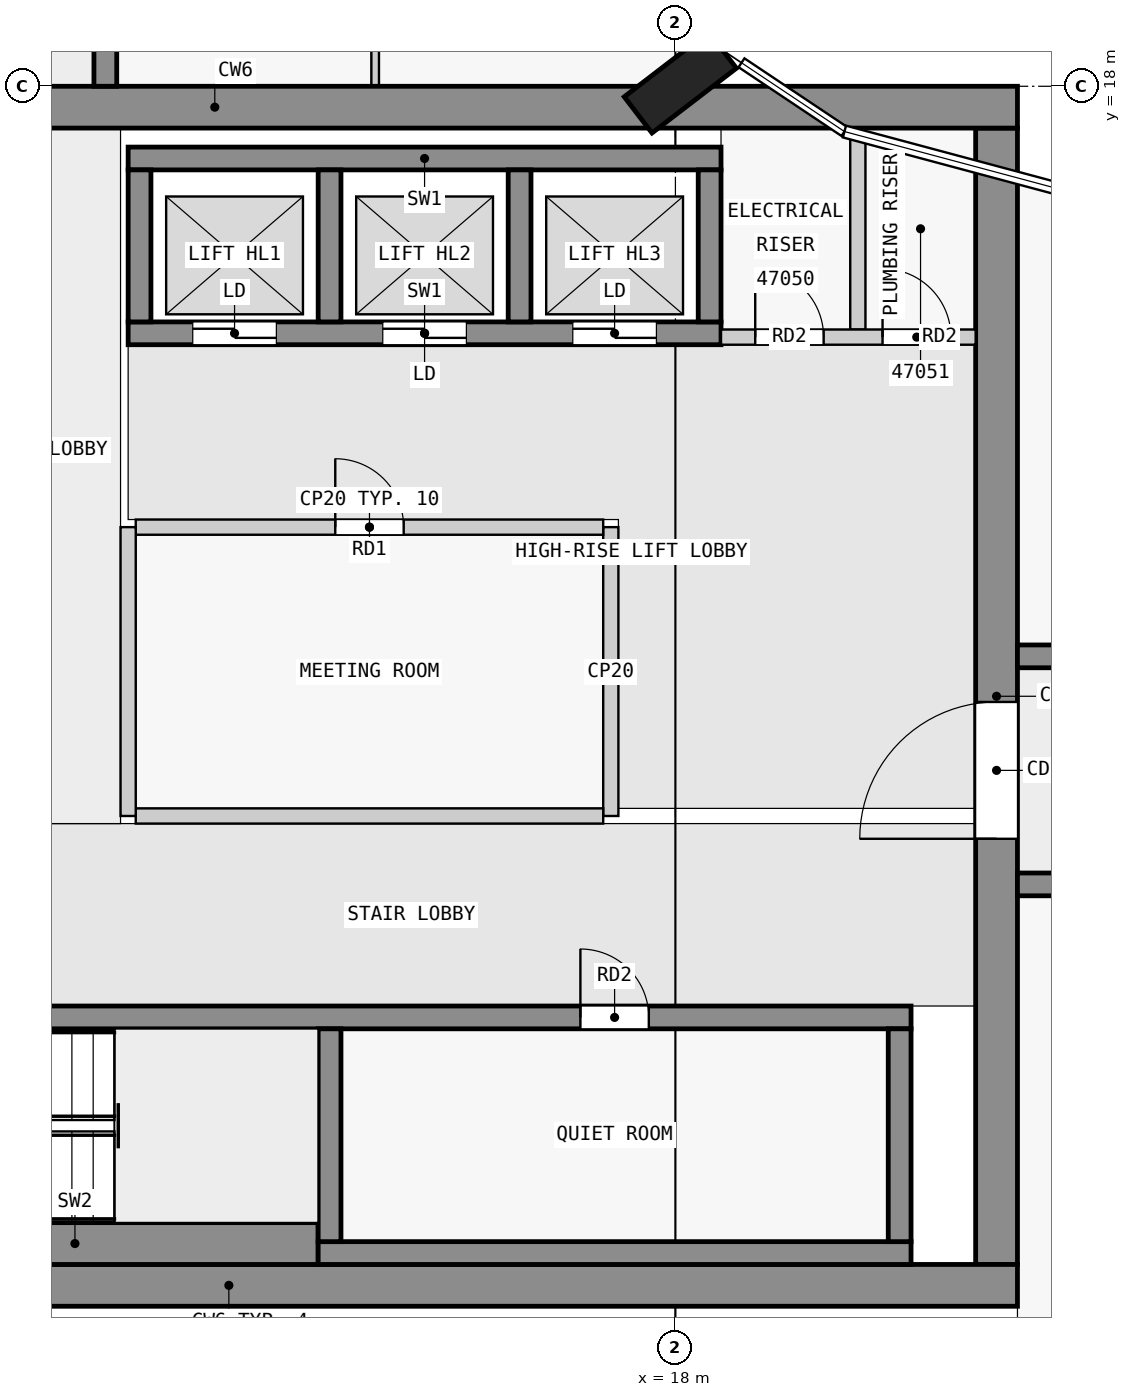
"""IFC4 building model, lengths in metres.
Left out: names, types, materials, properties, quantities, classifications, styles, units other than length and angle.
Written with IfcOpenShell. Run it as: python <this file> out.ifc"""

import sys

from ifc_helpers import new_model, si_unit, direction, frame, frame_2d, origin, origin_2d, place, context, subcontext, project, spatial, rectangle, extrude, element, fill, save


model = new_model("IFC4")
c1 = context("Model", 3, precision=1e-05, world=origin(), true_north=direction((0.0, 1.0)))
c2 = subcontext(c1, "Body", "Model", "MODEL_VIEW")
j1 = project(units=[si_unit("LENGTHUNIT", "METRE"), si_unit("PLANEANGLEUNIT", "RADIAN")], contexts=[c1])
p1 = place(None, origin())
s1 = spatial("IfcSite", under=j1, at=p1, CompositionType="ELEMENT")
p2 = place(p1, origin())
s2 = spatial("IfcBuilding", under=s1, at=p2, CompositionType="ELEMENT")
p3 = place(p2, frame((0.0, 0.0, 181.4)))
s3 = spatial("IfcBuildingStorey", under=s2, at=p3, CompositionType="ELEMENT", Elevation=181.4)
p4 = place(p3, frame((18.065, 18.05, 0.0), z_axis=(0.0, 0.0, 1.0), x_axis=(-0.608810846443, 0.793315418515, 0.0)))
e1 = element("IfcColumn", 1, at=p4, inside=s3, PredefinedType="COLUMN", context=c2, shape_type="SweptSolid", body=[
    extrude(rectangle(XDim=0.6, YDim=1.4, at=origin_2d()), origin(), (0.0, 0.0, 1.0), 3.5),
])
p5 = place(p3, frame((1.75, 2.225, 0.0), z_axis=(0.0, 0.0, 1.0), x_axis=(1.0, 0.0, 0.0)))
e2 = element("IfcWall", 2, at=p5, inside=s3, PredefinedType="SHEAR", context=c2, shape_type="SweptSolid", body=[
    extrude(rectangle(XDim=20.75, YDim=0.55, at=frame_2d((10.375, 0.0))), origin(), (0.0, 0.0, 1.0), 3.2),
])
p6 = place(p3, frame((1.38, 17.725, 0.0), z_axis=(0.0, 0.0, 1.0), x_axis=(1.0, 0.0, 0.0)))
e3 = element("IfcWall", 3, at=p6, inside=s3, PredefinedType="SHEAR", context=c2, shape_type="SweptSolid", body=[
    extrude(rectangle(XDim=21.12, YDim=0.55, at=frame_2d((10.56, 0.0))), origin(), (0.0, 0.0, 1.0), 3.2),
])
p7 = place(p6, frame((6.35, 0.0, 0.0)))
e4 = element("IfcOpeningElement", 4, at=p7, cuts=e3, PredefinedType="OPENING", context=c2, shape_type="SweptSolid", body=[
    extrude(rectangle(XDim=1.8, YDim=2.1, at=frame_2d((0.9, 1.05))), frame((0.0, 0.285, 0.0), z_axis=(0.0, -1.0, 0.0), x_axis=(1.0, 0.0, 0.0)), (0.0, 0.0, 1.0), 0.57),
])
p8 = place(p3, frame((22.225, 2.5, 0.0), z_axis=(0.0, 0.0, 1.0), x_axis=(0.0, 1.0, 0.0)))
e5 = element("IfcWall", 5, at=p8, inside=s3, PredefinedType="SHEAR", context=c2, shape_type="SweptSolid", body=[
    extrude(rectangle(XDim=14.95, YDim=0.55, at=frame_2d((7.475, 0.0))), origin(), (0.0, 0.0, 1.0), 3.2),
])
p9 = place(p8, frame((5.6, 0.0, 0.0)))
e6 = element("IfcOpeningElement", 6, at=p9, cuts=e5, PredefinedType="OPENING", context=c2, shape_type="SweptSolid", body=[
    extrude(rectangle(XDim=1.8, YDim=2.1, at=frame_2d((0.9, 1.05))), frame((0.0, 0.285, 0.0), z_axis=(0.0, -1.0, 0.0), x_axis=(1.0, 0.0, 0.0)), (0.0, 0.0, 1.0), 0.57),
])
p10 = place(p3, frame((6.9, 2.775, 0.0), z_axis=(0.0, 0.0, 1.0), x_axis=(1.0, 0.0, 0.0)))
e7 = element("IfcWall", 7, at=p10, inside=s3, PredefinedType="SHEAR", context=c2, shape_type="SweptSolid", body=[
    extrude(rectangle(XDim=6.4, YDim=0.55, at=frame_2d((3.2, 0.0))), origin(), (0.0, 0.0, 1.0), 3.2),
])
p11 = place(p3, frame((13.3, 2.65, 0.0), z_axis=(0.0, 0.0, 1.0), x_axis=(1.0, 0.0, 0.0)))
e8 = element("IfcWall", 8, at=p11, inside=s3, PredefinedType="SHEAR", context=c2, shape_type="SweptSolid", body=[
    extrude(rectangle(XDim=7.8, YDim=0.3, at=frame_2d((3.9, 0.0))), origin(), (0.0, 0.0, 1.0), 3.2),
])
for number, where, z_axis, x_axis in (
    (9, (13.45, 2.8, 0.0), (0.0, 0.0, 1.0), (0.0, 1.0, 0.0)),
    (10, (20.95, 2.8, 0.0), (0.0, 0.0, 1.0), (0.0, 1.0, 0.0)),
):
    element("IfcWall", number, at=place(p3, frame(where, z_axis=z_axis, x_axis=x_axis)), inside=s3, PredefinedType="SHEAR", context=c2, shape_type="SweptSolid", body=[
        extrude(rectangle(XDim=2.8, YDim=0.3, at=frame_2d((1.4, 0.0))), origin(), (0.0, 0.0, 1.0), 3.2),
    ])
p12 = place(p3, frame((2.3, 5.75, 0.0), z_axis=(0.0, 0.0, 1.0), x_axis=(1.0, 0.0, 0.0)))
e11 = element("IfcWall", 11, at=p12, inside=s3, PredefinedType="SHEAR", context=c2, shape_type="SweptSolid", body=[
    extrude(rectangle(XDim=18.8, YDim=0.3, at=frame_2d((9.4, 0.0))), origin(), (0.0, 0.0, 1.0), 3.2),
])
p13 = place(p12, frame((4.65, 0.0, 0.0)))
e12 = element("IfcOpeningElement", 12, at=p13, cuts=e11, PredefinedType="OPENING", context=c2, shape_type="SweptSolid", body=[
    extrude(rectangle(XDim=1.1, YDim=2.1, at=frame_2d((0.55, 1.05))), frame((0.0, 0.16, 0.0), z_axis=(0.0, -1.0, 0.0), x_axis=(1.0, 0.0, 0.0)), (0.0, 0.0, 1.0), 0.32),
])
p14 = place(p12, frame((0.45, 0.0, 0.0)))
e13 = element("IfcOpeningElement", 13, at=p14, cuts=e11, PredefinedType="OPENING", context=c2, shape_type="SweptSolid", body=[
    extrude(rectangle(XDim=1.1, YDim=2.1, at=frame_2d((0.55, 1.05))), frame((0.0, 0.16, 0.0), z_axis=(0.0, -1.0, 0.0), x_axis=(1.0, 0.0, 0.0)), (0.0, 0.0, 1.0), 0.32),
])
p15 = place(p12, frame((2.75, 0.0, 0.0)))
e14 = element("IfcOpeningElement", 14, at=p15, cuts=e11, PredefinedType="OPENING", context=c2, shape_type="SweptSolid", body=[
    extrude(rectangle(XDim=1.1, YDim=2.1, at=frame_2d((0.55, 1.05))), frame((0.0, 0.16, 0.0), z_axis=(0.0, -1.0, 0.0), x_axis=(1.0, 0.0, 0.0)), (0.0, 0.0, 1.0), 0.32),
])
p16 = place(p12, frame((14.45, 0.0, 0.0)))
e15 = element("IfcOpeningElement", 15, at=p16, cuts=e11, PredefinedType="OPENING", context=c2, shape_type="SweptSolid", body=[
    extrude(rectangle(XDim=0.9, YDim=2.1, at=frame_2d((0.45, 1.05))), frame((0.0, 0.16, 0.0), z_axis=(0.0, -1.0, 0.0), x_axis=(1.0, 0.0, 0.0)), (0.0, 0.0, 1.0), 0.32),
])
p17 = place(p3, frame((10.8, 17.05, 0.0), z_axis=(0.0, 0.0, 1.0), x_axis=(1.0, 0.0, 0.0)))
e16 = element("IfcWall", 16, at=p17, inside=s3, PredefinedType="SHEAR", context=c2, shape_type="SweptSolid", body=[
    extrude(rectangle(XDim=7.8, YDim=0.3, at=frame_2d((3.9, 0.0))), origin(), (0.0, 0.0, 1.0), 3.2),
])
p18 = place(p3, frame((10.8, 14.75, 0.0), z_axis=(0.0, 0.0, 1.0), x_axis=(1.0, 0.0, 0.0)))
e17 = element("IfcWall", 17, at=p18, inside=s3, PredefinedType="SHEAR", context=c2, shape_type="SweptSolid", body=[
    extrude(rectangle(XDim=7.8, YDim=0.3, at=frame_2d((3.9, 0.0))), origin(), (0.0, 0.0, 1.0), 3.2),
])
p19 = place(p18, frame((0.85, 0.0, 0.0)))
e18 = element("IfcOpeningElement", 18, at=p19, cuts=e17, PredefinedType="OPENING", context=c2, shape_type="SweptSolid", body=[
    extrude(rectangle(XDim=1.1, YDim=2.1, at=frame_2d((0.55, 1.05))), frame((0.0, 0.16, 0.0), z_axis=(0.0, -1.0, 0.0), x_axis=(1.0, 0.0, 0.0)), (0.0, 0.0, 1.0), 0.32),
])
p20 = place(p18, frame((3.35, 0.0, 0.0)))
e19 = element("IfcOpeningElement", 19, at=p20, cuts=e17, PredefinedType="OPENING", context=c2, shape_type="SweptSolid", body=[
    extrude(rectangle(XDim=1.1, YDim=2.1, at=frame_2d((0.55, 1.05))), frame((0.0, 0.16, 0.0), z_axis=(0.0, -1.0, 0.0), x_axis=(1.0, 0.0, 0.0)), (0.0, 0.0, 1.0), 0.32),
])
p21 = place(p18, frame((5.85, 0.0, 0.0)))
e20 = element("IfcOpeningElement", 20, at=p21, cuts=e17, PredefinedType="OPENING", context=c2, shape_type="SweptSolid", body=[
    extrude(rectangle(XDim=1.1, YDim=2.1, at=frame_2d((0.55, 1.05))), frame((0.0, 0.16, 0.0), z_axis=(0.0, -1.0, 0.0), x_axis=(1.0, 0.0, 0.0)), (0.0, 0.0, 1.0), 0.32),
])
for number, where, z_axis, x_axis in (
    (21, (10.95, 14.9, 0.0), (0.0, 0.0, 1.0), (0.0, 1.0, 0.0)),
    (22, (13.45, 14.9, 0.0), (0.0, 0.0, 1.0), (0.0, 1.0, 0.0)),
    (23, (15.95, 14.9, 0.0), (0.0, 0.0, 1.0), (0.0, 1.0, 0.0)),
    (24, (18.45, 14.9, 0.0), (0.0, 0.0, 1.0), (0.0, 1.0, 0.0)),
):
    element("IfcWall", number, at=place(p3, frame(where, z_axis=z_axis, x_axis=x_axis)), inside=s3, PredefinedType="SHEAR", context=c2, shape_type="SweptSolid", body=[
        extrude(rectangle(XDim=2.0, YDim=0.3, at=frame_2d((1.0, 0.0))), origin(), (0.0, 0.0, 1.0), 3.2),
    ])
p22 = place(p3, frame((22.5, 7.5, 0.0), z_axis=(0.0, 0.0, 1.0), x_axis=(1.0, 0.0, 0.0)))
e25 = element("IfcWall", 25, at=p22, inside=s3, PredefinedType="SHEAR", context=c2, shape_type="SweptSolid", body=[
    extrude(rectangle(XDim=22.5, YDim=0.3, at=frame_2d((11.25, 0.0))), origin(), (0.0, 0.0, 1.0), 3.2),
])
p23 = place(p22, frame((3.65, 0.0, 0.0)))
e26 = element("IfcOpeningElement", 26, at=p23, cuts=e25, PredefinedType="OPENING", context=c2, shape_type="SweptSolid", body=[
    extrude(rectangle(XDim=1.8, YDim=2.1, at=frame_2d((0.9, 1.05))), frame((0.0, 0.16, 0.0), z_axis=(0.0, -1.0, 0.0), x_axis=(1.0, 0.0, 0.0)), (0.0, 0.0, 1.0), 0.32),
])
p24 = place(p22, frame((12.65, 0.0, 0.0)))
e27 = element("IfcOpeningElement", 27, at=p24, cuts=e25, PredefinedType="OPENING", context=c2, shape_type="SweptSolid", body=[
    extrude(rectangle(XDim=1.8, YDim=2.1, at=frame_2d((0.9, 1.05))), frame((0.0, 0.16, 0.0), z_axis=(0.0, -1.0, 0.0), x_axis=(1.0, 0.0, 0.0)), (0.0, 0.0, 1.0), 0.32),
])
p25 = place(p22, frame((18.75, 0.0, 0.0)))
e28 = element("IfcOpeningElement", 28, at=p25, cuts=e25, PredefinedType="OPENING", context=c2, shape_type="SweptSolid", body=[
    extrude(rectangle(XDim=0.9, YDim=2.1, at=frame_2d((0.45, 1.05))), frame((0.0, 0.16, 0.0), z_axis=(0.0, -1.0, 0.0), x_axis=(1.0, 0.0, 0.0)), (0.0, 0.0, 1.0), 0.32),
])
p26 = place(p22, frame((20.95, 0.0, 0.0)))
e29 = element("IfcOpeningElement", 29, at=p26, cuts=e25, PredefinedType="OPENING", context=c2, shape_type="SweptSolid", body=[
    extrude(rectangle(XDim=1.0, YDim=2.1, at=frame_2d((0.5, 1.05))), frame((0.0, 0.16, 0.0), z_axis=(0.0, -1.0, 0.0), x_axis=(1.0, 0.0, 0.0)), (0.0, 0.0, 1.0), 0.32),
])
p27 = place(p3, frame((22.5, 10.5, 0.0), z_axis=(0.0, 0.0, 1.0), x_axis=(1.0, 0.0, 0.0)))
e30 = element("IfcWall", 30, at=p27, inside=s3, PredefinedType="SHEAR", context=c2, shape_type="SweptSolid", body=[
    extrude(rectangle(XDim=22.5, YDim=0.3, at=frame_2d((11.25, 0.0))), origin(), (0.0, 0.0, 1.0), 3.2),
])
p28 = place(p27, frame((3.65, 0.0, 0.0)))
e31 = element("IfcOpeningElement", 31, at=p28, cuts=e30, PredefinedType="OPENING", context=c2, shape_type="SweptSolid", body=[
    extrude(rectangle(XDim=1.8, YDim=2.1, at=frame_2d((0.9, 1.05))), frame((0.0, 0.16, 0.0), z_axis=(0.0, -1.0, 0.0), x_axis=(1.0, 0.0, 0.0)), (0.0, 0.0, 1.0), 0.32),
])
p29 = place(p27, frame((10.35, 0.0, 0.0)))
e32 = element("IfcOpeningElement", 32, at=p29, cuts=e30, PredefinedType="OPENING", context=c2, shape_type="SweptSolid", body=[
    extrude(rectangle(XDim=1.8, YDim=2.1, at=frame_2d((0.9, 1.05))), frame((0.0, 0.16, 0.0), z_axis=(0.0, -1.0, 0.0), x_axis=(1.0, 0.0, 0.0)), (0.0, 0.0, 1.0), 0.32),
])
p30 = place(p27, frame((14.35, 0.0, 0.0)))
e33 = element("IfcOpeningElement", 33, at=p30, cuts=e30, PredefinedType="OPENING", context=c2, shape_type="SweptSolid", body=[
    extrude(rectangle(XDim=0.9, YDim=2.1, at=frame_2d((0.45, 1.05))), frame((0.0, 0.16, 0.0), z_axis=(0.0, -1.0, 0.0), x_axis=(1.0, 0.0, 0.0)), (0.0, 0.0, 1.0), 0.32),
])
p31 = place(p27, frame((16.65, 0.0, 0.0)))
e34 = element("IfcOpeningElement", 34, at=p31, cuts=e30, PredefinedType="OPENING", context=c2, shape_type="SweptSolid", body=[
    extrude(rectangle(XDim=0.9, YDim=2.1, at=frame_2d((0.45, 1.05))), frame((0.0, 0.16, 0.0), z_axis=(0.0, -1.0, 0.0), x_axis=(1.0, 0.0, 0.0)), (0.0, 0.0, 1.0), 0.32),
])
p32 = place(p27, frame((19.35, 0.0, 0.0)))
e35 = element("IfcOpeningElement", 35, at=p32, cuts=e30, PredefinedType="OPENING", context=c2, shape_type="SweptSolid", body=[
    extrude(rectangle(XDim=1.8, YDim=2.1, at=frame_2d((0.9, 1.05))), frame((0.0, 0.16, 0.0), z_axis=(0.0, -1.0, 0.0), x_axis=(1.0, 0.0, 0.0)), (0.0, 0.0, 1.0), 0.32),
])
p33 = place(p3, frame((10.5, 18.0, 0.0), z_axis=(0.0, 0.0, 1.0), x_axis=(0.0, 1.0, 0.0)))
e36 = element("IfcWall", 36, at=p33, inside=s3, PredefinedType="SHEAR", context=c2, shape_type="SweptSolid", body=[
    extrude(rectangle(XDim=27.0, YDim=0.3, at=frame_2d((13.5, 0.0))), origin(), (0.0, 0.0, 1.0), 3.2),
])
p34 = place(p33, frame((4.05, 0.0, 0.0)))
e37 = element("IfcOpeningElement", 37, at=p34, cuts=e36, PredefinedType="OPENING", context=c2, shape_type="SweptSolid", body=[
    extrude(rectangle(XDim=1.0, YDim=2.1, at=frame_2d((0.5, 1.05))), frame((0.0, 0.16, 0.0), z_axis=(0.0, -1.0, 0.0), x_axis=(1.0, 0.0, 0.0)), (0.0, 0.0, 1.0), 0.32),
])
p35 = place(p33, frame((13.05, 0.0, 0.0)))
e38 = element("IfcOpeningElement", 38, at=p35, cuts=e36, PredefinedType="OPENING", context=c2, shape_type="SweptSolid", body=[
    extrude(rectangle(XDim=1.0, YDim=2.1, at=frame_2d((0.5, 1.05))), frame((0.0, 0.16, 0.0), z_axis=(0.0, -1.0, 0.0), x_axis=(1.0, 0.0, 0.0)), (0.0, 0.0, 1.0), 0.32),
])
p36 = place(p33, frame((21.35, 0.0, 0.0)))
e39 = element("IfcOpeningElement", 39, at=p36, cuts=e36, PredefinedType="OPENING", context=c2, shape_type="SweptSolid", body=[
    extrude(rectangle(XDim=1.0, YDim=2.1, at=frame_2d((0.5, 1.05))), frame((0.0, 0.16, 0.0), z_axis=(0.0, -1.0, 0.0), x_axis=(1.0, 0.0, 0.0)), (0.0, 0.0, 1.0), 0.32),
])
p37 = place(p3, frame((10.8, 8.4, 0.0), z_axis=(0.0, 0.0, 1.0), x_axis=(0.0, 1.0, 0.0)))
e40 = element("IfcWall", 40, at=p37, inside=s3, PredefinedType="PARTITIONING", context=c2, shape_type="SweptSolid", body=[
    extrude(rectangle(XDim=3.8, YDim=0.2, at=frame_2d((1.9, 0.0))), origin(), (0.0, 0.0, 1.0), 3.2),
])
p38 = place(p3, frame((10.9, 8.4, 0.0), z_axis=(0.0, 0.0, 1.0), x_axis=(1.0, 0.0, 0.0)))
e41 = element("IfcWall", 41, at=p38, inside=s3, PredefinedType="PARTITIONING", context=c2, shape_type="SweptSolid", body=[
    extrude(rectangle(XDim=6.15, YDim=0.2, at=frame_2d((3.075, 0.0))), origin(), (0.0, 0.0, 1.0), 3.2),
])
p39 = place(p3, frame((17.15, 8.4, 0.0), z_axis=(0.0, 0.0, 1.0), x_axis=(0.0, 1.0, 0.0)))
e42 = element("IfcWall", 42, at=p39, inside=s3, PredefinedType="PARTITIONING", context=c2, shape_type="SweptSolid", body=[
    extrude(rectangle(XDim=3.8, YDim=0.2, at=frame_2d((1.9, 0.0))), origin(), (0.0, 0.0, 1.0), 3.2),
])
p40 = place(p3, frame((10.9, 12.2, 0.0), z_axis=(0.0, 0.0, 1.0), x_axis=(1.0, 0.0, 0.0)))
e43 = element("IfcWall", 43, at=p40, inside=s3, PredefinedType="PARTITIONING", context=c2, shape_type="SweptSolid", body=[
    extrude(rectangle(XDim=6.15, YDim=0.2, at=frame_2d((3.075, 0.0))), origin(), (0.0, 0.0, 1.0), 3.2),
])
p41 = place(p40, frame((2.625, 0.0, 0.0)))
e44 = element("IfcOpeningElement", 44, at=p41, cuts=e43, PredefinedType="OPENING", context=c2, shape_type="SweptSolid", body=[
    extrude(rectangle(XDim=0.9, YDim=2.1, at=frame_2d((0.45, 1.05))), frame((0.0, 0.11, 0.0), z_axis=(0.0, -1.0, 0.0), x_axis=(1.0, 0.0, 0.0)), (0.0, 0.0, 1.0), 0.22),
])
p42 = place(p3, frame((18.6, 14.7, 0.0), z_axis=(0.0, 0.0, 1.0), x_axis=(1.0, 0.0, 0.0)))
e45 = element("IfcWall", 45, at=p42, inside=s3, PredefinedType="PARTITIONING", context=c2, shape_type="SweptSolid", body=[
    extrude(rectangle(XDim=3.35, YDim=0.2, at=frame_2d((1.675, 0.0))), origin(), (0.0, 0.0, 1.0), 3.2),
])
p43 = place(p42, frame((0.45, 0.0, 0.0)))
e46 = element("IfcOpeningElement", 46, at=p43, cuts=e45, PredefinedType="OPENING", context=c2, shape_type="SweptSolid", body=[
    extrude(rectangle(XDim=0.9, YDim=2.1, at=frame_2d((0.45, 1.05))), frame((0.0, 0.11, 0.0), z_axis=(0.0, -1.0, 0.0), x_axis=(1.0, 0.0, 0.0)), (0.0, 0.0, 1.0), 0.22),
])
p44 = place(p42, frame((2.125, 0.0, 0.0)))
e47 = element("IfcOpeningElement", 47, at=p44, cuts=e45, PredefinedType="OPENING", context=c2, shape_type="SweptSolid", body=[
    extrude(rectangle(XDim=0.9, YDim=2.1, at=frame_2d((0.45, 1.05))), frame((0.0, 0.11, 0.0), z_axis=(0.0, -1.0, 0.0), x_axis=(1.0, 0.0, 0.0)), (0.0, 0.0, 1.0), 0.22),
])
p45 = place(p3, frame((20.4, 14.8, 0.0), z_axis=(0.0, 0.0, 1.0), x_axis=(0.0, 1.0, 0.0)))
e48 = element("IfcWall", 48, at=p45, inside=s3, PredefinedType="PARTITIONING", context=c2, shape_type="SweptSolid", body=[
    extrude(rectangle(XDim=2.65, YDim=0.2, at=frame_2d((1.325, 0.0))), origin(), (0.0, 0.0, 1.0), 3.2),
])
p46 = place(p3, frame((14.05, 18.0, 0.0), z_axis=(0.0, 0.0, 1.0), x_axis=(0.0, 1.0, 0.0)))
e49 = element("IfcWall", 49, at=p46, inside=s3, PredefinedType="PARTITIONING", context=c2, shape_type="SweptSolid", body=[
    extrude(rectangle(XDim=1.75, YDim=0.1, at=frame_2d((0.875, 0.0))), origin(), (0.0, 0.0, 1.0), 3.2),
])
p47 = place(p41, origin())
e50 = element("IfcDoor", 50, at=p47, inside=s3, OperationType="SINGLE_SWING_LEFT", PredefinedType="DOOR", context=c2, shape_type="SweptSolid", body=[
    extrude(rectangle(XDim=0.9, YDim=2.1, at=frame_2d((0.45, 1.05))), frame((0.0, 0.025, 0.0), z_axis=(0.0, -1.0, 0.0), x_axis=(1.0, 0.0, 0.0)), (0.0, 0.0, 1.0), 0.05),
])
fill(e44, e50)
p48 = place(p19, origin())
e51 = element("IfcDoor", 51, at=p48, inside=s3, OperationType="DOUBLE_DOOR_SLIDING", PredefinedType="DOOR", context=c2, shape_type="SweptSolid", body=[
    extrude(rectangle(XDim=1.1, YDim=2.1, at=frame_2d((0.55, 1.05))), frame((0.0, 0.025, 0.0), z_axis=(0.0, -1.0, 0.0), x_axis=(1.0, 0.0, 0.0)), (0.0, 0.0, 1.0), 0.05),
])
fill(e18, e51)
p49 = place(p20, origin())
e52 = element("IfcDoor", 52, at=p49, inside=s3, OperationType="DOUBLE_DOOR_SLIDING", PredefinedType="DOOR", context=c2, shape_type="SweptSolid", body=[
    extrude(rectangle(XDim=1.1, YDim=2.1, at=frame_2d((0.55, 1.05))), frame((0.0, 0.025, 0.0), z_axis=(0.0, -1.0, 0.0), x_axis=(1.0, 0.0, 0.0)), (0.0, 0.0, 1.0), 0.05),
])
fill(e19, e52)
p50 = place(p21, origin())
e53 = element("IfcDoor", 53, at=p50, inside=s3, OperationType="DOUBLE_DOOR_SLIDING", PredefinedType="DOOR", context=c2, shape_type="SweptSolid", body=[
    extrude(rectangle(XDim=1.1, YDim=2.1, at=frame_2d((0.55, 1.05))), frame((0.0, 0.025, 0.0), z_axis=(0.0, -1.0, 0.0), x_axis=(1.0, 0.0, 0.0)), (0.0, 0.0, 1.0), 0.05),
])
fill(e20, e53)
p51 = place(p9, origin())
e54 = element("IfcDoor", 54, at=p51, inside=s3, OperationType="DOUBLE_DOOR_SINGLE_SWING", PredefinedType="DOOR", context=c2, shape_type="SweptSolid", body=[
    extrude(rectangle(XDim=1.8, YDim=2.1, at=frame_2d((0.9, 1.05))), frame((0.0, 0.025, 0.0), z_axis=(0.0, -1.0, 0.0), x_axis=(1.0, 0.0, 0.0)), (0.0, 0.0, 1.0), 0.05),
])
fill(e6, e54)
p52 = place(p43, origin())
e55 = element("IfcDoor", 55, at=p52, inside=s3, OperationType="SINGLE_SWING_LEFT", PredefinedType="DOOR", context=c2, shape_type="SweptSolid", body=[
    extrude(rectangle(XDim=0.9, YDim=2.1, at=frame_2d((0.45, 1.05))), frame((0.0, 0.025, 0.0), z_axis=(0.0, -1.0, 0.0), x_axis=(1.0, 0.0, 0.0)), (0.0, 0.0, 1.0), 0.05),
])
fill(e46, e55)
p53 = place(p44, origin())
e56 = element("IfcDoor", 56, at=p53, inside=s3, OperationType="SINGLE_SWING_LEFT", PredefinedType="DOOR", context=c2, shape_type="SweptSolid", body=[
    extrude(rectangle(XDim=0.9, YDim=2.1, at=frame_2d((0.45, 1.05))), frame((0.0, 0.025, 0.0), z_axis=(0.0, -1.0, 0.0), x_axis=(1.0, 0.0, 0.0)), (0.0, 0.0, 1.0), 0.05),
])
fill(e47, e56)
p54 = place(p16, origin())
e57 = element("IfcDoor", 57, at=p54, inside=s3, OperationType="SINGLE_SWING_LEFT", PredefinedType="DOOR", context=c2, shape_type="SweptSolid", body=[
    extrude(rectangle(XDim=0.9, YDim=2.1, at=frame_2d((0.45, 1.05))), frame((0.0, 0.025, 0.0), z_axis=(0.0, -1.0, 0.0), x_axis=(1.0, 0.0, 0.0)), (0.0, 0.0, 1.0), 0.05),
])
fill(e15, e57)
save(model, sys.argv[1])
